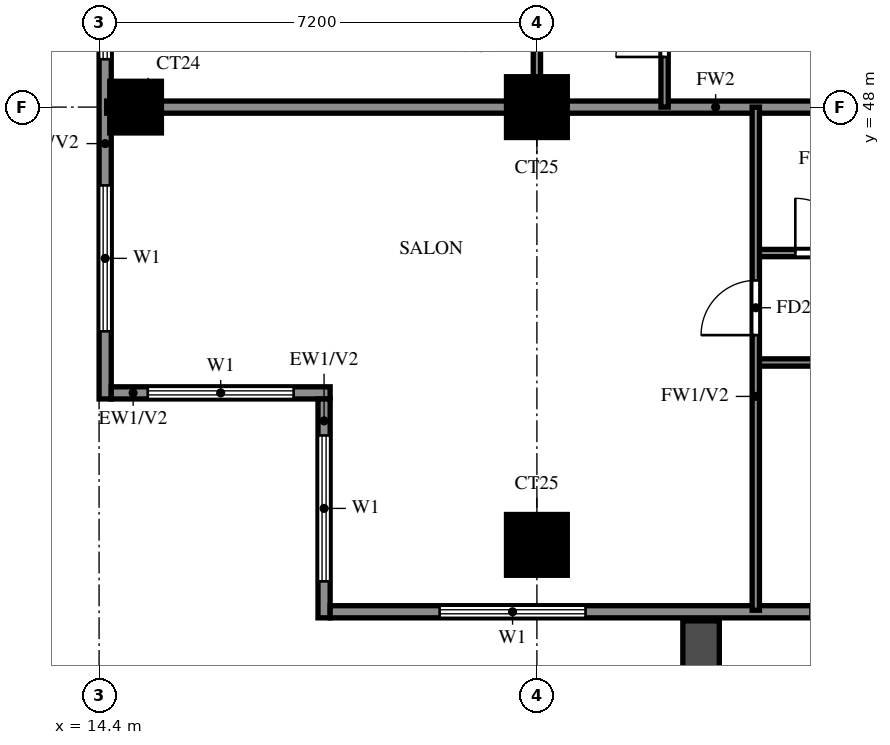
"""IFC4 building model, lengths in metres.
Left out: names, types, materials, properties, quantities, classifications, styles, units other than length and angle.
Written with IfcOpenShell. Run it as: python <this file> out.ifc"""

import sys

from ifc_helpers import new_model, si_unit, direction, frame, frame_2d, origin, origin_2d, place, context, subcontext, project, spatial, rectangle, extrude, source, transform, mapped, element, fill, save


model = new_model("IFC4")
c1 = context("Model", 3, precision=1e-05, world=origin(), true_north=direction((0.0, 1.0)))
c2 = subcontext(c1, "Body", "Model", "MODEL_VIEW")
j1 = project(units=[si_unit("LENGTHUNIT", "METRE"), si_unit("PLANEANGLEUNIT", "RADIAN")], contexts=[c1])
p1 = place(None, origin())
s1 = spatial("IfcSite", under=j1, at=p1, CompositionType="ELEMENT")
p2 = place(p1, origin())
s2 = spatial("IfcBuilding", under=s1, at=p2, CompositionType="ELEMENT")
p3 = place(p2, frame((0.0, 0.0, 164.0)))
s3 = spatial("IfcBuildingStorey", under=s2, at=p3, CompositionType="ELEMENT", Elevation=164.0)
m1 = source(origin(), c2, "Body", "SweptSolid", [
    extrude(rectangle(XDim=1.0, YDim=1.0, at=origin_2d()), origin(), (0.0, 0.0, 1.0), 3.2),
])
p4 = place(p3, frame((21.6, 40.8, 0.0), z_axis=(0.0, 0.0, 1.0), x_axis=(1.0, 0.0, 0.0)))
e1 = element("IfcColumn", 1, at=p4, inside=s3, PredefinedType="COLUMN", context=c2, shape_type="MappedRepresentation", body=[
    mapped(m1, transform((0.0, 0.0, 0.0))),
])
m2 = source(origin(), c2, "Body", "SweptSolid", [
    extrude(rectangle(XDim=0.85, YDim=0.85, at=origin_2d()), origin(), (0.0, 0.0, 1.0), 3.2),
])
p5 = place(p3, frame((15.0, 48.0, 0.0), z_axis=(0.0, 0.0, 1.0), x_axis=(1.0, 0.0, 0.0)))
e2 = element("IfcColumn", 2, at=p5, inside=s3, PredefinedType="COLUMN", context=c2, shape_type="MappedRepresentation", body=[
    mapped(m2, transform((0.0, 0.0, 0.0))),
])
p6 = place(p3, frame((21.6, 48.0, 0.0), z_axis=(0.0, 0.0, 1.0), x_axis=(1.0, 0.0, 0.0)))
e3 = element("IfcColumn", 3, at=p6, inside=s3, PredefinedType="COLUMN", context=c2, shape_type="MappedRepresentation", body=[
    mapped(m1, transform((0.0, 0.0, 0.0))),
])
p7 = place(p3, frame((14.5, 55.2, 0.0), z_axis=(0.0, 0.0, 1.0), x_axis=(0.0, -1.0, 0.0)))
e4 = element("IfcWall", 4, at=p7, inside=s3, PredefinedType="SOLIDWALL", context=c2, shape_type="SweptSolid", body=[
    extrude(rectangle(XDim=12.0, YDim=0.2, at=frame_2d((6.0, 0.0))), origin(), (0.0, 0.0, 1.0), 3.2),
])
p8 = place(p7, frame((8.488, 0.0, 0.6)))
e5 = element("IfcOpeningElement", 5, at=p8, cuts=e4, PredefinedType="OPENING", context=c2, shape_type="SweptSolid", body=[
    extrude(rectangle(XDim=2.4, YDim=2.4, at=frame_2d((1.2, 1.2))), frame((0.0, 0.11, 0.0), z_axis=(0.0, -1.0, 0.0), x_axis=(1.0, 0.0, 0.0)), (0.0, 0.0, 1.0), 0.22),
])
p9 = place(p7, frame((4.012, 0.0, 0.6)))
e6 = element("IfcOpeningElement", 6, at=p9, cuts=e4, PredefinedType="OPENING", context=c2, shape_type="SweptSolid", body=[
    extrude(rectangle(XDim=2.4, YDim=2.4, at=frame_2d((1.2, 1.2))), frame((0.0, 0.11, 0.0), z_axis=(0.0, -1.0, 0.0), x_axis=(1.0, 0.0, 0.0)), (0.0, 0.0, 1.0), 0.22),
])
p10 = place(p7, frame((1.538, 0.0, 1.5)))
e7 = element("IfcOpeningElement", 7, at=p10, cuts=e4, PredefinedType="OPENING", context=c2, shape_type="SweptSolid", body=[
    extrude(rectangle(XDim=0.9, YDim=0.9, at=frame_2d((0.45, 0.45))), frame((0.0, 0.11, 0.0), z_axis=(0.0, -1.0, 0.0), x_axis=(1.0, 0.0, 0.0)), (0.0, 0.0, 1.0), 0.22),
])
p11 = place(p3, frame((14.6, 43.3, 0.0), z_axis=(0.0, 0.0, 1.0), x_axis=(1.0, 0.0, 0.0)))
e8 = element("IfcWall", 8, at=p11, inside=s3, PredefinedType="SOLIDWALL", context=c2, shape_type="SweptSolid", body=[
    extrude(rectangle(XDim=3.6, YDim=0.2, at=frame_2d((1.8, 0.0))), origin(), (0.0, 0.0, 1.0), 3.2),
])
p12 = place(p11, frame((0.6, 0.0, 0.6)))
e9 = element("IfcOpeningElement", 9, at=p12, cuts=e8, PredefinedType="OPENING", context=c2, shape_type="SweptSolid", body=[
    extrude(rectangle(XDim=2.4, YDim=2.4, at=frame_2d((1.2, 1.2))), frame((0.0, 0.11, 0.0), z_axis=(0.0, -1.0, 0.0), x_axis=(1.0, 0.0, 0.0)), (0.0, 0.0, 1.0), 0.22),
])
p13 = place(p3, frame((18.1, 43.2, 0.0), z_axis=(0.0, 0.0, 1.0), x_axis=(0.0, -1.0, 0.0)))
e10 = element("IfcWall", 10, at=p13, inside=s3, PredefinedType="SOLIDWALL", context=c2, shape_type="SweptSolid", body=[
    extrude(rectangle(XDim=3.6, YDim=0.2, at=frame_2d((1.8, 0.0))), origin(), (0.0, 0.0, 1.0), 3.2),
])
p14 = place(p13, frame((0.6, 0.0, 0.6)))
e11 = element("IfcOpeningElement", 11, at=p14, cuts=e10, PredefinedType="OPENING", context=c2, shape_type="SweptSolid", body=[
    extrude(rectangle(XDim=2.4, YDim=2.4, at=frame_2d((1.2, 1.2))), frame((0.0, 0.11, 0.0), z_axis=(0.0, -1.0, 0.0), x_axis=(1.0, 0.0, 0.0)), (0.0, 0.0, 1.0), 0.22),
])
p15 = place(p3, frame((18.2, 39.7, 0.0), z_axis=(0.0, 0.0, 1.0), x_axis=(1.0, 0.0, 0.0)))
e12 = element("IfcWall", 12, at=p15, inside=s3, PredefinedType="SOLIDWALL", context=c2, shape_type="SweptSolid", body=[
    extrude(rectangle(XDim=23.8, YDim=0.2, at=frame_2d((11.9, 0.0))), origin(), (0.0, 0.0, 1.0), 3.2),
])
p16 = place(p15, frame((7.9, 0.0, 0.0)))
e13 = element("IfcOpeningElement", 13, at=p16, cuts=e12, PredefinedType="OPENING", context=c2, shape_type="SweptSolid", body=[
    extrude(rectangle(XDim=1.8, YDim=2.4, at=frame_2d((0.9, 1.2))), frame((0.0, 0.11, 0.0), z_axis=(0.0, -1.0, 0.0), x_axis=(1.0, 0.0, 0.0)), (0.0, 0.0, 1.0), 0.22),
])
p17 = place(p15, frame((1.8, 0.0, 0.6)))
e14 = element("IfcOpeningElement", 14, at=p17, cuts=e12, PredefinedType="OPENING", context=c2, shape_type="SweptSolid", body=[
    extrude(rectangle(XDim=2.4, YDim=2.4, at=frame_2d((1.2, 1.2))), frame((0.0, 0.11, 0.0), z_axis=(0.0, -1.0, 0.0), x_axis=(1.0, 0.0, 0.0)), (0.0, 0.0, 1.0), 0.22),
])
p18 = place(p15, frame((10.9, 0.0, 0.6)))
e15 = element("IfcOpeningElement", 15, at=p18, cuts=e12, PredefinedType="OPENING", context=c2, shape_type="SweptSolid", body=[
    extrude(rectangle(XDim=1.2, YDim=2.4, at=frame_2d((0.6, 1.2))), frame((0.0, 0.11, 0.0), z_axis=(0.0, -1.0, 0.0), x_axis=(1.0, 0.0, 0.0)), (0.0, 0.0, 1.0), 0.22),
])
p19 = place(p15, frame((13.3, 0.0, 0.6)))
e16 = element("IfcOpeningElement", 16, at=p19, cuts=e12, PredefinedType="OPENING", context=c2, shape_type="SweptSolid", body=[
    extrude(rectangle(XDim=1.8, YDim=2.4, at=frame_2d((0.9, 1.2))), frame((0.0, 0.11, 0.0), z_axis=(0.0, -1.0, 0.0), x_axis=(1.0, 0.0, 0.0)), (0.0, 0.0, 1.0), 0.22),
])
p20 = place(p3, frame((24.3, 39.55, 0.0), z_axis=(0.0, 0.0, 1.0), x_axis=(0.0, -1.0, 0.0)))
e17 = element("IfcWall", 17, at=p20, inside=s3, PredefinedType="SOLIDWALL", context=c2, shape_type="SweptSolid", body=[
    extrude(rectangle(XDim=2.65, YDim=0.6, at=frame_2d((1.325, 0.0))), origin(), (0.0, 0.0, 1.0), 2.85),
])
p21 = place(p3, frame((14.525, 48.0, 0.0), z_axis=(0.0, 0.0, 1.0), x_axis=(1.0, 0.0, 0.0)))
e18 = element("IfcWall", 18, at=p21, inside=s3, PredefinedType="SOLIDWALL", context=c2, shape_type="SweptSolid", body=[
    extrude(rectangle(XDim=19.075, YDim=0.2, at=frame_2d((9.538, 0.0))), origin(), (0.0, 0.0, 1.0), 3.2),
])
p22 = place(p3, frame((25.2, 43.8, 0.0), z_axis=(0.0, 0.0, 1.0), x_axis=(1.0, 0.0, 0.0)))
e19 = element("IfcWall", 19, at=p22, inside=s3, PredefinedType="PARTITIONING", context=c2, shape_type="SweptSolid", body=[
    extrude(rectangle(XDim=8.4, YDim=0.12, at=frame_2d((4.2, 0.0))), origin(), (0.0, 0.0, 1.0), 3.2),
])
p23 = place(p22, frame((1.35, 0.0, 0.0)))
e20 = element("IfcOpeningElement", 20, at=p23, cuts=e19, PredefinedType="OPENING", context=c2, shape_type="SweptSolid", body=[
    extrude(rectangle(XDim=0.9, YDim=2.1, at=frame_2d((0.45, 1.05))), frame((0.0, 0.07, 0.0), z_axis=(0.0, -1.0, 0.0), x_axis=(1.0, 0.0, 0.0)), (0.0, 0.0, 1.0), 0.14),
])
p24 = place(p22, frame((5.55, 0.0, 0.0)))
e21 = element("IfcOpeningElement", 21, at=p24, cuts=e19, PredefinedType="OPENING", context=c2, shape_type="SweptSolid", body=[
    extrude(rectangle(XDim=0.9, YDim=2.1, at=frame_2d((0.45, 1.05))), frame((0.0, 0.07, 0.0), z_axis=(0.0, -1.0, 0.0), x_axis=(1.0, 0.0, 0.0)), (0.0, 0.0, 1.0), 0.14),
])
p25 = place(p3, frame((25.2, 45.6, 0.0), z_axis=(0.0, 0.0, 1.0), x_axis=(1.0, 0.0, 0.0)))
e22 = element("IfcWall", 22, at=p25, inside=s3, PredefinedType="PARTITIONING", context=c2, shape_type="SweptSolid", body=[
    extrude(rectangle(XDim=6.0, YDim=0.12, at=frame_2d((3.0, 0.0))), origin(), (0.0, 0.0, 1.0), 3.2),
])
p26 = place(p25, frame((0.65, 0.0, 0.0)))
e23 = element("IfcOpeningElement", 23, at=p26, cuts=e22, PredefinedType="OPENING", context=c2, shape_type="SweptSolid", body=[
    extrude(rectangle(XDim=0.9, YDim=2.1, at=frame_2d((0.45, 1.05))), frame((0.0, 0.07, 0.0), z_axis=(0.0, -1.0, 0.0), x_axis=(1.0, 0.0, 0.0)), (0.0, 0.0, 1.0), 0.14),
])
p27 = place(p25, frame((3.65, 0.0, 0.0)))
e24 = element("IfcOpeningElement", 24, at=p27, cuts=e22, PredefinedType="OPENING", context=c2, shape_type="SweptSolid", body=[
    extrude(rectangle(XDim=0.9, YDim=2.1, at=frame_2d((0.45, 1.05))), frame((0.0, 0.07, 0.0), z_axis=(0.0, -1.0, 0.0), x_axis=(1.0, 0.0, 0.0)), (0.0, 0.0, 1.0), 0.14),
])
p28 = place(p3, frame((21.6, 48.0, 0.0), z_axis=(0.0, 0.0, 1.0), x_axis=(0.0, 1.0, 0.0)))
e25 = element("IfcWall", 25, at=p28, inside=s3, PredefinedType="PARTITIONING", context=c2, shape_type="SweptSolid", body=[
    extrude(rectangle(XDim=3.6, YDim=0.12, at=frame_2d((1.8, 0.0))), origin(), (0.0, 0.0, 1.0), 3.2),
])
p29 = place(p28, frame((1.35, 0.0, 0.0)))
e26 = element("IfcOpeningElement", 26, at=p29, cuts=e25, PredefinedType="OPENING", context=c2, shape_type="SweptSolid", body=[
    extrude(rectangle(XDim=0.9, YDim=2.1, at=frame_2d((0.45, 1.05))), frame((0.0, 0.07, 0.0), z_axis=(0.0, -1.0, 0.0), x_axis=(1.0, 0.0, 0.0)), (0.0, 0.0, 1.0), 0.14),
])
p30 = place(p3, frame((23.7, 48.0, 0.0), z_axis=(0.0, 0.0, 1.0), x_axis=(0.0, 1.0, 0.0)))
e27 = element("IfcWall", 27, at=p30, inside=s3, PredefinedType="PARTITIONING", context=c2, shape_type="SweptSolid", body=[
    extrude(rectangle(XDim=6.0, YDim=0.12, at=frame_2d((3.0, 0.0))), origin(), (0.0, 0.0, 1.0), 3.2),
])
p31 = place(p30, frame((0.825, 0.0, 0.0)))
e28 = element("IfcOpeningElement", 28, at=p31, cuts=e27, PredefinedType="OPENING", context=c2, shape_type="SweptSolid", body=[
    extrude(rectangle(XDim=0.8, YDim=2.1, at=frame_2d((0.4, 1.05))), frame((0.0, 0.07, 0.0), z_axis=(0.0, -1.0, 0.0), x_axis=(1.0, 0.0, 0.0)), (0.0, 0.0, 1.0), 0.14),
])
p32 = place(p3, frame((25.2, 39.725, 0.0), z_axis=(0.0, 0.0, 1.0), x_axis=(0.0, 1.0, 0.0)))
e29 = element("IfcWall", 29, at=p32, inside=s3, PredefinedType="PARTITIONING", context=c2, shape_type="SweptSolid", body=[
    extrude(rectangle(XDim=8.275, YDim=0.12, at=frame_2d((4.137, 0.0))), origin(), (0.0, 0.0, 1.0), 3.2),
])
p33 = place(p32, frame((4.525, 0.0, 0.0)))
e30 = element("IfcOpeningElement", 30, at=p33, cuts=e29, PredefinedType="OPENING", context=c2, shape_type="SweptSolid", body=[
    extrude(rectangle(XDim=0.9, YDim=2.1, at=frame_2d((0.45, 1.05))), frame((0.0, 0.07, 0.0), z_axis=(0.0, -1.0, 0.0), x_axis=(1.0, 0.0, 0.0)), (0.0, 0.0, 1.0), 0.14),
])
p34 = place(p8, origin())
e31 = element("IfcWindow", 31, at=p34, inside=s3, PartitioningType="DOUBLE_PANEL_VERTICAL", PredefinedType="WINDOW", context=c2, shape_type="SweptSolid", body=[
    extrude(rectangle(XDim=2.4, YDim=2.4, at=frame_2d((1.2, 1.2))), frame((0.0, 0.03, 0.0), z_axis=(0.0, -1.0, 0.0), x_axis=(1.0, 0.0, 0.0)), (0.0, 0.0, 1.0), 0.06),
])
fill(e5, e31)
p35 = place(p9, origin())
e32 = element("IfcWindow", 32, at=p35, inside=s3, PartitioningType="DOUBLE_PANEL_VERTICAL", PredefinedType="WINDOW", context=c2, shape_type="SweptSolid", body=[
    extrude(rectangle(XDim=2.4, YDim=2.4, at=frame_2d((1.2, 1.2))), frame((0.0, 0.03, 0.0), z_axis=(0.0, -1.0, 0.0), x_axis=(1.0, 0.0, 0.0)), (0.0, 0.0, 1.0), 0.06),
])
fill(e6, e32)
p36 = place(p12, origin())
e33 = element("IfcWindow", 33, at=p36, inside=s3, PartitioningType="DOUBLE_PANEL_VERTICAL", PredefinedType="WINDOW", context=c2, shape_type="SweptSolid", body=[
    extrude(rectangle(XDim=2.4, YDim=2.4, at=frame_2d((1.2, 1.2))), frame((0.0, 0.03, 0.0), z_axis=(0.0, -1.0, 0.0), x_axis=(1.0, 0.0, 0.0)), (0.0, 0.0, 1.0), 0.06),
])
fill(e9, e33)
p37 = place(p14, origin())
e34 = element("IfcWindow", 34, at=p37, inside=s3, PartitioningType="DOUBLE_PANEL_VERTICAL", PredefinedType="WINDOW", context=c2, shape_type="SweptSolid", body=[
    extrude(rectangle(XDim=2.4, YDim=2.4, at=frame_2d((1.2, 1.2))), frame((0.0, 0.03, 0.0), z_axis=(0.0, -1.0, 0.0), x_axis=(1.0, 0.0, 0.0)), (0.0, 0.0, 1.0), 0.06),
])
fill(e11, e34)
p38 = place(p16, origin())
e35 = element("IfcDoor", 35, at=p38, inside=s3, OperationType="DOUBLE_DOOR_SLIDING", PredefinedType="DOOR", context=c2, shape_type="SweptSolid", body=[
    extrude(rectangle(XDim=1.8, YDim=2.4, at=frame_2d((0.9, 1.2))), frame((0.0, 0.025, 0.0), z_axis=(0.0, -1.0, 0.0), x_axis=(1.0, 0.0, 0.0)), (0.0, 0.0, 1.0), 0.05),
])
fill(e13, e35)
p39 = place(p17, origin())
e36 = element("IfcWindow", 36, at=p39, inside=s3, PartitioningType="DOUBLE_PANEL_VERTICAL", PredefinedType="WINDOW", context=c2, shape_type="SweptSolid", body=[
    extrude(rectangle(XDim=2.4, YDim=2.4, at=frame_2d((1.2, 1.2))), frame((0.0, 0.03, 0.0), z_axis=(0.0, -1.0, 0.0), x_axis=(1.0, 0.0, 0.0)), (0.0, 0.0, 1.0), 0.06),
])
fill(e14, e36)
p40 = place(p33, origin())
e37 = element("IfcDoor", 37, at=p40, inside=s3, OperationType="SINGLE_SWING_LEFT", PredefinedType="DOOR", context=c2, shape_type="SweptSolid", body=[
    extrude(rectangle(XDim=0.9, YDim=2.1, at=frame_2d((0.45, 1.05))), frame((0.0, 0.025, 0.0), z_axis=(0.0, -1.0, 0.0), x_axis=(1.0, 0.0, 0.0)), (0.0, 0.0, 1.0), 0.05),
])
fill(e30, e37)
p41 = place(p26, origin())
e38 = element("IfcDoor", 38, at=p41, inside=s3, OperationType="SINGLE_SWING_LEFT", PredefinedType="DOOR", context=c2, shape_type="SweptSolid", body=[
    extrude(rectangle(XDim=0.9, YDim=2.1, at=frame_2d((0.45, 1.05))), frame((0.0, 0.025, 0.0), z_axis=(0.0, -1.0, 0.0), x_axis=(1.0, 0.0, 0.0)), (0.0, 0.0, 1.0), 0.05),
])
fill(e23, e38)
p42 = place(p31, origin())
e39 = element("IfcDoor", 39, at=p42, inside=s3, OperationType="SINGLE_SWING_RIGHT", PredefinedType="DOOR", context=c2, shape_type="SweptSolid", body=[
    extrude(rectangle(XDim=0.8, YDim=2.1, at=frame_2d((0.4, 1.05))), frame((0.0, 0.025, 0.0), z_axis=(0.0, -1.0, 0.0), x_axis=(1.0, 0.0, 0.0)), (0.0, 0.0, 1.0), 0.05),
])
fill(e28, e39)
save(model, sys.argv[1])
